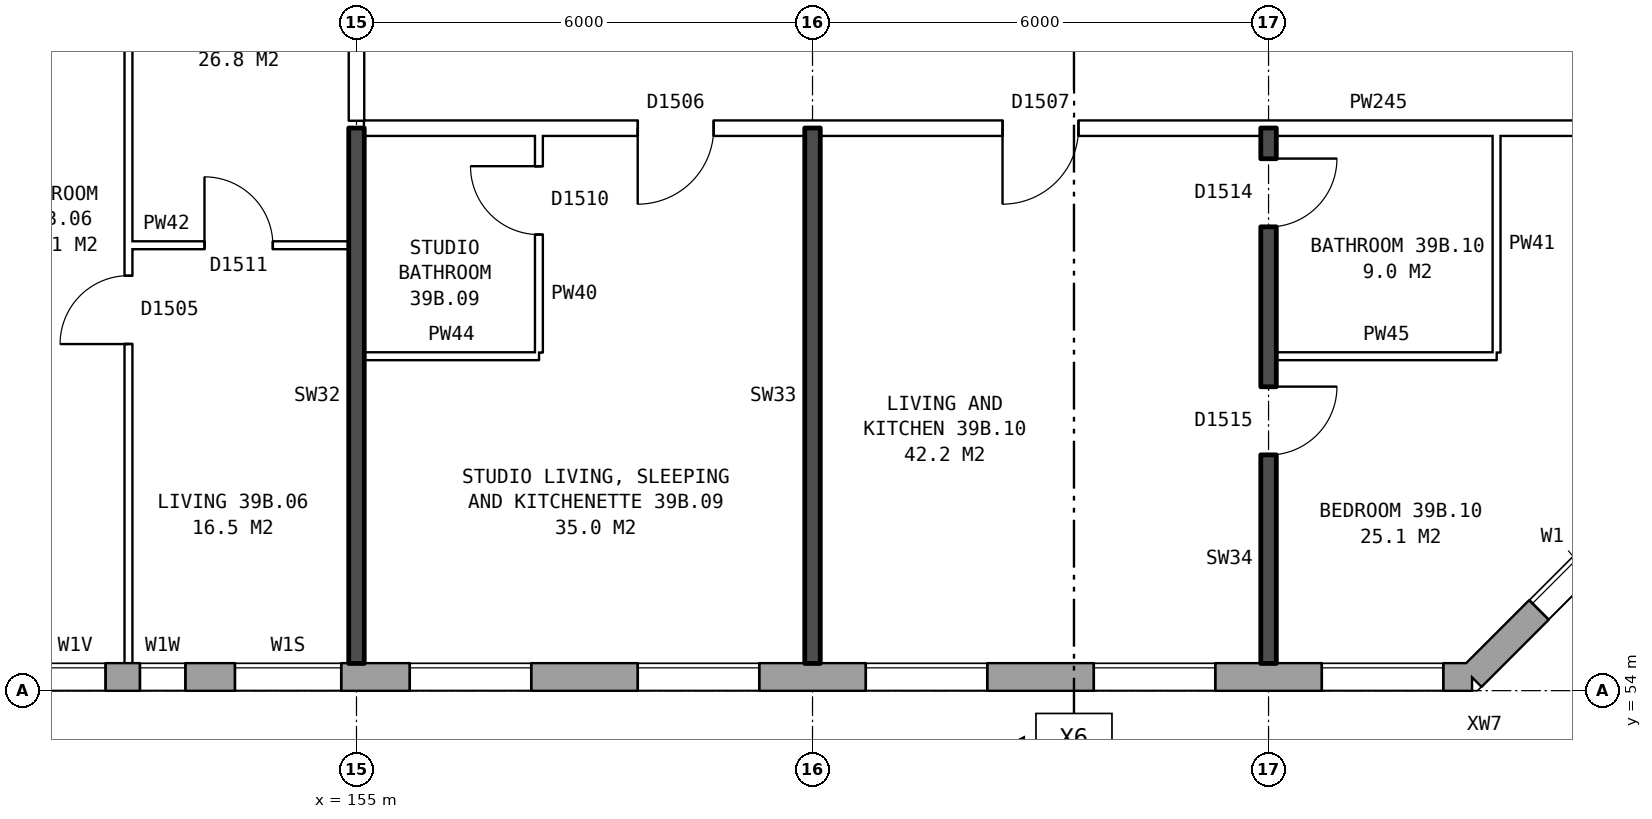
"""IFC4 building model, lengths in metres.
Left out: names, types, materials, properties, quantities, classifications, styles, units other than length and angle.
Written with IfcOpenShell. Run it as: python <this file> out.ifc"""

import sys

from ifc_helpers import new_model, si_unit, direction, frame, frame_2d, origin, place, context, subcontext, project, spatial, rectangle, extrude, element, fill, save


model = new_model("IFC4")
c1 = context("Model", 3, precision=1e-05, world=origin(), true_north=direction((0.0, 1.0)))
c2 = subcontext(c1, "Body", "Model", "MODEL_VIEW")
j1 = project(units=[si_unit("LENGTHUNIT", "METRE"), si_unit("PLANEANGLEUNIT", "RADIAN")], contexts=[c1])
p1 = place(None, origin())
s1 = spatial("IfcSite", under=j1, at=p1, CompositionType="ELEMENT")
p2 = place(p1, origin())
s2 = spatial("IfcBuilding", under=s1, at=p2, CompositionType="ELEMENT")
p3 = place(p2, frame((0.0, 0.0, 139.2)))
s3 = spatial("IfcBuildingStorey", under=s2, at=p3, CompositionType="ELEMENT", Elevation=139.2)
p4 = place(p3, frame((134.075, 54.18, 0.0), z_axis=(0.0, 0.0, 1.0), x_axis=(1.0, 0.0, 0.0)))
e1 = element("IfcWall", 1, at=p4, inside=s3, PredefinedType="STANDARD", context=c2, shape_type="SweptSolid", body=[
    extrude(rectangle(XDim=35.601, YDim=0.36, at=frame_2d((17.8, 0.0))), origin(), (0.0, 0.0, 1.0), 2.85),
])
p5 = place(p4, frame((0.625, 0.0, 0.8)))
e2 = element("IfcOpeningElement", 2, at=p5, cuts=e1, PredefinedType="OPENING", context=c2, shape_type="SweptSolid", body=[
    extrude(rectangle(XDim=1.6, YDim=1.8, at=frame_2d((0.8, 0.9))), frame((0.0, 0.19, 0.0), z_axis=(0.0, -1.0, 0.0), x_axis=(1.0, 0.0, 0.0)), (0.0, 0.0, 1.0), 0.38),
])
p6 = place(p4, frame((3.625, 0.0, 0.8)))
e3 = element("IfcOpeningElement", 3, at=p6, cuts=e1, PredefinedType="OPENING", context=c2, shape_type="SweptSolid", body=[
    extrude(rectangle(XDim=1.6, YDim=1.8, at=frame_2d((0.8, 0.9))), frame((0.0, 0.19, 0.0), z_axis=(0.0, -1.0, 0.0), x_axis=(1.0, 0.0, 0.0)), (0.0, 0.0, 1.0), 0.38),
])
p7 = place(p4, frame((6.625, 0.0, 0.8)))
e4 = element("IfcOpeningElement", 4, at=p7, cuts=e1, PredefinedType="OPENING", context=c2, shape_type="SweptSolid", body=[
    extrude(rectangle(XDim=1.6, YDim=1.8, at=frame_2d((0.8, 0.9))), frame((0.0, 0.19, 0.0), z_axis=(0.0, -1.0, 0.0), x_axis=(1.0, 0.0, 0.0)), (0.0, 0.0, 1.0), 0.38),
])
p8 = place(p4, frame((9.625, 0.0, 0.8)))
e5 = element("IfcOpeningElement", 5, at=p8, cuts=e1, PredefinedType="OPENING", context=c2, shape_type="SweptSolid", body=[
    extrude(rectangle(XDim=1.6, YDim=1.8, at=frame_2d((0.8, 0.9))), frame((0.0, 0.19, 0.0), z_axis=(0.0, -1.0, 0.0), x_axis=(1.0, 0.0, 0.0)), (0.0, 0.0, 1.0), 0.38),
])
p9 = place(p4, frame((12.625, 0.0, 0.8)))
e6 = element("IfcOpeningElement", 6, at=p9, cuts=e1, PredefinedType="OPENING", context=c2, shape_type="SweptSolid", body=[
    extrude(rectangle(XDim=1.6, YDim=1.8, at=frame_2d((0.8, 0.9))), frame((0.0, 0.19, 0.0), z_axis=(0.0, -1.0, 0.0), x_axis=(1.0, 0.0, 0.0)), (0.0, 0.0, 1.0), 0.38),
])
p10 = place(p4, frame((15.125, 0.0, 1.25)))
e7 = element("IfcOpeningElement", 7, at=p10, cuts=e1, PredefinedType="OPENING", context=c2, shape_type="SweptSolid", body=[
    extrude(rectangle(XDim=0.8, YDim=1.2, at=frame_2d((0.4, 0.6))), frame((0.0, 0.19, 0.0), z_axis=(0.0, -1.0, 0.0), x_axis=(1.0, 0.0, 0.0)), (0.0, 0.0, 1.0), 0.38),
])
p11 = place(p4, frame((18.075, 0.0, 0.25)))
e8 = element("IfcOpeningElement", 8, at=p11, cuts=e1, PredefinedType="OPENING", context=c2, shape_type="SweptSolid", body=[
    extrude(rectangle(XDim=0.6, YDim=0.9, at=frame_2d((0.3, 0.45))), frame((0.0, 0.19, 0.0), z_axis=(0.0, -1.0, 0.0), x_axis=(1.0, 0.0, 0.0)), (0.0, 0.0, 1.0), 0.38),
])
p12 = place(p4, frame((21.625, 0.0, 0.8)))
e9 = element("IfcOpeningElement", 9, at=p12, cuts=e1, PredefinedType="OPENING", context=c2, shape_type="SweptSolid", body=[
    extrude(rectangle(XDim=1.6, YDim=1.8, at=frame_2d((0.8, 0.9))), frame((0.0, 0.19, 0.0), z_axis=(0.0, -1.0, 0.0), x_axis=(1.0, 0.0, 0.0)), (0.0, 0.0, 1.0), 0.38),
])
p13 = place(p4, frame((24.625, 0.0, 0.8)))
e10 = element("IfcOpeningElement", 10, at=p13, cuts=e1, PredefinedType="OPENING", context=c2, shape_type="SweptSolid", body=[
    extrude(rectangle(XDim=1.6, YDim=1.8, at=frame_2d((0.8, 0.9))), frame((0.0, 0.19, 0.0), z_axis=(0.0, -1.0, 0.0), x_axis=(1.0, 0.0, 0.0)), (0.0, 0.0, 1.0), 0.38),
])
p14 = place(p4, frame((27.625, 0.0, 0.8)))
e11 = element("IfcOpeningElement", 11, at=p14, cuts=e1, PredefinedType="OPENING", context=c2, shape_type="SweptSolid", body=[
    extrude(rectangle(XDim=1.6, YDim=1.8, at=frame_2d((0.8, 0.9))), frame((0.0, 0.19, 0.0), z_axis=(0.0, -1.0, 0.0), x_axis=(1.0, 0.0, 0.0)), (0.0, 0.0, 1.0), 0.38),
])
p15 = place(p4, frame((30.625, 0.0, 0.8)))
e12 = element("IfcOpeningElement", 12, at=p15, cuts=e1, PredefinedType="OPENING", context=c2, shape_type="SweptSolid", body=[
    extrude(rectangle(XDim=1.6, YDim=1.8, at=frame_2d((0.8, 0.9))), frame((0.0, 0.19, 0.0), z_axis=(0.0, -1.0, 0.0), x_axis=(1.0, 0.0, 0.0)), (0.0, 0.0, 1.0), 0.38),
])
p16 = place(p4, frame((33.625, 0.0, 0.8)))
e13 = element("IfcOpeningElement", 13, at=p16, cuts=e1, PredefinedType="OPENING", context=c2, shape_type="SweptSolid", body=[
    extrude(rectangle(XDim=1.6, YDim=1.8, at=frame_2d((0.8, 0.9))), frame((0.0, 0.19, 0.0), z_axis=(0.0, -1.0, 0.0), x_axis=(1.0, 0.0, 0.0)), (0.0, 0.0, 1.0), 0.38),
])
p17 = place(p4, frame((16.825, 0.0, 0.15)))
e14 = element("IfcOpeningElement", 14, at=p17, cuts=e1, PredefinedType="OPENING", context=c2, shape_type="SweptSolid", body=[
    extrude(rectangle(XDim=0.8, YDim=0.9, at=frame_2d((0.4, 0.45))), frame((0.0, 0.19, 0.0), z_axis=(0.0, -1.0, 0.0), x_axis=(1.0, 0.0, 0.0)), (0.0, 0.0, 1.0), 0.38),
])
p18 = place(p4, frame((19.325, 0.0, 1.65)))
e15 = element("IfcOpeningElement", 15, at=p18, cuts=e1, PredefinedType="OPENING", context=c2, shape_type="SweptSolid", body=[
    extrude(rectangle(XDim=1.4, YDim=0.9, at=frame_2d((0.7, 0.45))), frame((0.0, 0.19, 0.0), z_axis=(0.0, -1.0, 0.0), x_axis=(1.0, 0.0, 0.0)), (0.0, 0.0, 1.0), 0.38),
])
p19 = place(p3, frame((169.675, 54.18, 0.0), z_axis=(0.0, 0.0, 1.0), x_axis=(0.707106781187, 0.707106781187, 0.0)))
e16 = element("IfcWall", 16, at=p19, inside=s3, PredefinedType="STANDARD", context=c2, shape_type="SweptSolid", body=[
    extrude(rectangle(XDim=4.094, YDim=0.36, at=frame_2d((2.047, 0.0))), origin(), (0.0, 0.0, 1.0), 2.85),
])
p20 = place(p19, frame((1.247, 0.0, 0.8)))
e17 = element("IfcOpeningElement", 17, at=p20, cuts=e16, PredefinedType="OPENING", context=c2, shape_type="SweptSolid", body=[
    extrude(rectangle(XDim=1.6, YDim=1.8, at=frame_2d((0.8, 0.9))), frame((0.0, 0.19, 0.0), z_axis=(0.0, -1.0, 0.0), x_axis=(1.0, 0.0, 0.0)), (0.0, 0.0, 1.0), 0.38),
])
p21 = place(p3, frame((155.1, 58.4, 0.0), z_axis=(0.0, 0.0, 1.0), x_axis=(1.0, 0.0, 0.0)))
e18 = element("IfcWall", 18, at=p21, inside=s3, PredefinedType="PARTITIONING", context=c2, shape_type="SweptSolid", body=[
    extrude(rectangle(XDim=2.3, YDim=0.1, at=frame_2d((1.15, 0.0))), origin(), (0.0, 0.0, 1.0), 2.85),
])
p22 = place(p3, frame((167.1, 58.4, 0.0), z_axis=(0.0, 0.0, 1.0), x_axis=(1.0, 0.0, 0.0)))
e19 = element("IfcWall", 19, at=p22, inside=s3, PredefinedType="PARTITIONING", context=c2, shape_type="SweptSolid", body=[
    extrude(rectangle(XDim=2.9, YDim=0.1, at=frame_2d((1.45, 0.0))), origin(), (0.0, 0.0, 1.0), 2.85),
])
p23 = place(p3, frame((152.0, 59.86, 0.0), z_axis=(0.0, 0.0, 1.0), x_axis=(1.0, 0.0, 0.0)))
e20 = element("IfcWall", 20, at=p23, inside=s3, PredefinedType="PARTITIONING", context=c2, shape_type="SweptSolid", body=[
    extrude(rectangle(XDim=2.9, YDim=0.1, at=frame_2d((1.45, 0.0))), origin(), (0.0, 0.0, 1.0), 2.85),
])
p24 = place(p23, frame((1.0, 0.0, 0.0)))
e21 = element("IfcOpeningElement", 21, at=p24, cuts=e20, PredefinedType="OPENING", context=c2, shape_type="SweptSolid", body=[
    extrude(rectangle(XDim=0.9, YDim=2.1, at=frame_2d((0.45, 1.05))), frame((0.0, 0.06, 0.0), z_axis=(0.0, -1.0, 0.0), x_axis=(1.0, 0.0, 0.0)), (0.0, 0.0, 1.0), 0.12),
])
p25 = place(p3, frame((155.1, 61.4, 0.0), z_axis=(0.0, 0.0, 1.0), x_axis=(1.0, 0.0, 0.0)))
e22 = element("IfcWall", 22, at=p25, inside=s3, PredefinedType="PARTITIONING", context=c2, shape_type="SweptSolid", body=[
    extrude(rectangle(XDim=17.29, YDim=0.2, at=frame_2d((8.645, 0.0))), origin(), (0.0, 0.0, 1.0), 2.85),
])
p26 = place(p25, frame((3.6, 0.0, 0.0)))
e23 = element("IfcOpeningElement", 23, at=p26, cuts=e22, PredefinedType="OPENING", context=c2, shape_type="SweptSolid", body=[
    extrude(rectangle(XDim=1.0, YDim=2.1, at=frame_2d((0.5, 1.05))), frame((0.0, 0.11, 0.0), z_axis=(0.0, -1.0, 0.0), x_axis=(1.0, 0.0, 0.0)), (0.0, 0.0, 1.0), 0.22),
])
p27 = place(p25, frame((8.4, 0.0, 0.0)))
e24 = element("IfcOpeningElement", 24, at=p27, cuts=e22, PredefinedType="OPENING", context=c2, shape_type="SweptSolid", body=[
    extrude(rectangle(XDim=1.0, YDim=2.1, at=frame_2d((0.5, 1.05))), frame((0.0, 0.11, 0.0), z_axis=(0.0, -1.0, 0.0), x_axis=(1.0, 0.0, 0.0)), (0.0, 0.0, 1.0), 0.22),
])
p28 = place(p3, frame((152.0, 54.36, 0.0), z_axis=(0.0, 0.0, 1.0), x_axis=(0.0, 1.0, 0.0)))
e25 = element("IfcWall", 25, at=p28, inside=s3, PredefinedType="PARTITIONING", context=c2, shape_type="SweptSolid", body=[
    extrude(rectangle(XDim=14.34, YDim=0.1, at=frame_2d((7.17, 0.0))), origin(), (0.0, 0.0, 1.0), 2.85),
])
p29 = place(p28, frame((4.2, 0.0, 0.0)))
e26 = element("IfcOpeningElement", 26, at=p29, cuts=e25, PredefinedType="OPENING", context=c2, shape_type="SweptSolid", body=[
    extrude(rectangle(XDim=0.9, YDim=2.1, at=frame_2d((0.45, 1.05))), frame((0.0, 0.06, 0.0), z_axis=(0.0, -1.0, 0.0), x_axis=(1.0, 0.0, 0.0)), (0.0, 0.0, 1.0), 0.12),
])
p30 = place(p28, frame((13.04, 0.0, 0.0)))
e27 = element("IfcOpeningElement", 27, at=p30, cuts=e25, PredefinedType="OPENING", context=c2, shape_type="SweptSolid", body=[
    extrude(rectangle(XDim=0.9, YDim=2.1, at=frame_2d((0.45, 1.05))), frame((0.0, 0.06, 0.0), z_axis=(0.0, -1.0, 0.0), x_axis=(1.0, 0.0, 0.0)), (0.0, 0.0, 1.0), 0.12),
])
p31 = place(p3, frame((155.0, 54.36, 0.0), z_axis=(0.0, 0.0, 1.0), x_axis=(0.0, 1.0, 0.0)))
e28 = element("IfcWall", 28, at=p31, inside=s3, PredefinedType="SOLIDWALL", context=c2, shape_type="SweptSolid", body=[
    extrude(rectangle(XDim=7.04, YDim=0.2, at=frame_2d((3.52, 0.0))), origin(), (0.0, 0.0, 1.0), 2.85),
])
p32 = place(p3, frame((155.0, 61.5, 0.0), z_axis=(0.0, 0.0, 1.0), x_axis=(0.0, 1.0, 0.0)))
e29 = element("IfcWall", 29, at=p32, inside=s3, PredefinedType="PARTITIONING", context=c2, shape_type="SweptSolid", body=[
    extrude(rectangle(XDim=2.2, YDim=0.2, at=frame_2d((1.1, 0.0))), origin(), (0.0, 0.0, 1.0), 2.85),
])
p33 = place(p3, frame((157.4, 58.45, 0.0), z_axis=(0.0, 0.0, 1.0), x_axis=(0.0, 1.0, 0.0)))
e30 = element("IfcWall", 30, at=p33, inside=s3, PredefinedType="PARTITIONING", context=c2, shape_type="SweptSolid", body=[
    extrude(rectangle(XDim=2.85, YDim=0.1, at=frame_2d((1.425, 0.0))), origin(), (0.0, 0.0, 1.0), 2.85),
])
p34 = place(p33, frame((1.55, 0.0, 0.0)))
e31 = element("IfcOpeningElement", 31, at=p34, cuts=e30, PredefinedType="OPENING", context=c2, shape_type="SweptSolid", body=[
    extrude(rectangle(XDim=0.9, YDim=2.1, at=frame_2d((0.45, 1.05))), frame((0.0, 0.06, 0.0), z_axis=(0.0, -1.0, 0.0), x_axis=(1.0, 0.0, 0.0)), (0.0, 0.0, 1.0), 0.12),
])
p35 = place(p3, frame((161.0, 54.36, 0.0), z_axis=(0.0, 0.0, 1.0), x_axis=(0.0, 1.0, 0.0)))
e32 = element("IfcWall", 32, at=p35, inside=s3, PredefinedType="SOLIDWALL", context=c2, shape_type="SweptSolid", body=[
    extrude(rectangle(XDim=7.04, YDim=0.2, at=frame_2d((3.52, 0.0))), origin(), (0.0, 0.0, 1.0), 2.85),
])
p36 = place(p3, frame((167.0, 54.36, 0.0), z_axis=(0.0, 0.0, 1.0), x_axis=(0.0, 1.0, 0.0)))
e33 = element("IfcWall", 33, at=p36, inside=s3, PredefinedType="SOLIDWALL", context=c2, shape_type="SweptSolid", body=[
    extrude(rectangle(XDim=7.04, YDim=0.2, at=frame_2d((3.52, 0.0))), origin(), (0.0, 0.0, 1.0), 2.85),
])
p37 = place(p36, frame((2.74, 0.0, 0.0)))
e34 = element("IfcOpeningElement", 34, at=p37, cuts=e33, PredefinedType="OPENING", context=c2, shape_type="SweptSolid", body=[
    extrude(rectangle(XDim=0.9, YDim=2.1, at=frame_2d((0.45, 1.05))), frame((0.0, 0.11, 0.0), z_axis=(0.0, -1.0, 0.0), x_axis=(1.0, 0.0, 0.0)), (0.0, 0.0, 1.0), 0.22),
])
p38 = place(p36, frame((5.74, 0.0, 0.0)))
e35 = element("IfcOpeningElement", 35, at=p38, cuts=e33, PredefinedType="OPENING", context=c2, shape_type="SweptSolid", body=[
    extrude(rectangle(XDim=0.9, YDim=2.1, at=frame_2d((0.45, 1.05))), frame((0.0, 0.11, 0.0), z_axis=(0.0, -1.0, 0.0), x_axis=(1.0, 0.0, 0.0)), (0.0, 0.0, 1.0), 0.22),
])
p39 = place(p3, frame((170.0, 58.45, 0.0), z_axis=(0.0, 0.0, 1.0), x_axis=(0.0, 1.0, 0.0)))
e36 = element("IfcWall", 36, at=p39, inside=s3, PredefinedType="PARTITIONING", context=c2, shape_type="SweptSolid", body=[
    extrude(rectangle(XDim=2.85, YDim=0.1, at=frame_2d((1.425, 0.0))), origin(), (0.0, 0.0, 1.0), 2.85),
])
p40 = place(p11, origin())
e37 = element("IfcWindow", 37, at=p40, inside=s3, PartitioningType="SINGLE_PANEL", PredefinedType="WINDOW", context=c2, shape_type="SweptSolid", body=[
    extrude(rectangle(XDim=0.6, YDim=0.9, at=frame_2d((0.3, 0.45))), frame((0.0, 0.15, 0.0), z_axis=(0.0, -1.0, 0.0), x_axis=(1.0, 0.0, 0.0)), (0.0, 0.0, 1.0), 0.06),
])
fill(e8, e37)
p41 = place(p12, origin())
e38 = element("IfcWindow", 38, at=p41, inside=s3, PartitioningType="SINGLE_PANEL", PredefinedType="WINDOW", context=c2, shape_type="SweptSolid", body=[
    extrude(rectangle(XDim=1.6, YDim=1.8, at=frame_2d((0.8, 0.9))), frame((0.0, 0.15, 0.0), z_axis=(0.0, -1.0, 0.0), x_axis=(1.0, 0.0, 0.0)), (0.0, 0.0, 1.0), 0.06),
])
fill(e9, e38)
p42 = place(p13, origin())
e39 = element("IfcWindow", 39, at=p42, inside=s3, PartitioningType="SINGLE_PANEL", PredefinedType="WINDOW", context=c2, shape_type="SweptSolid", body=[
    extrude(rectangle(XDim=1.6, YDim=1.8, at=frame_2d((0.8, 0.9))), frame((0.0, 0.15, 0.0), z_axis=(0.0, -1.0, 0.0), x_axis=(1.0, 0.0, 0.0)), (0.0, 0.0, 1.0), 0.06),
])
fill(e10, e39)
p43 = place(p14, origin())
e40 = element("IfcWindow", 40, at=p43, inside=s3, PartitioningType="SINGLE_PANEL", PredefinedType="WINDOW", context=c2, shape_type="SweptSolid", body=[
    extrude(rectangle(XDim=1.6, YDim=1.8, at=frame_2d((0.8, 0.9))), frame((0.0, 0.15, 0.0), z_axis=(0.0, -1.0, 0.0), x_axis=(1.0, 0.0, 0.0)), (0.0, 0.0, 1.0), 0.06),
])
fill(e11, e40)
p44 = place(p15, origin())
e41 = element("IfcWindow", 41, at=p44, inside=s3, PartitioningType="SINGLE_PANEL", PredefinedType="WINDOW", context=c2, shape_type="SweptSolid", body=[
    extrude(rectangle(XDim=1.6, YDim=1.8, at=frame_2d((0.8, 0.9))), frame((0.0, 0.15, 0.0), z_axis=(0.0, -1.0, 0.0), x_axis=(1.0, 0.0, 0.0)), (0.0, 0.0, 1.0), 0.06),
])
fill(e12, e41)
p45 = place(p16, origin())
e42 = element("IfcWindow", 42, at=p45, inside=s3, PartitioningType="SINGLE_PANEL", PredefinedType="WINDOW", context=c2, shape_type="SweptSolid", body=[
    extrude(rectangle(XDim=1.6, YDim=1.8, at=frame_2d((0.8, 0.9))), frame((0.0, 0.15, 0.0), z_axis=(0.0, -1.0, 0.0), x_axis=(1.0, 0.0, 0.0)), (0.0, 0.0, 1.0), 0.06),
])
fill(e13, e42)
p46 = place(p20, origin())
e43 = element("IfcWindow", 43, at=p46, inside=s3, PartitioningType="SINGLE_PANEL", PredefinedType="WINDOW", context=c2, shape_type="SweptSolid", body=[
    extrude(rectangle(XDim=1.6, YDim=1.8, at=frame_2d((0.8, 0.9))), frame((0.0, 0.15, 0.0), z_axis=(0.0, -1.0, 0.0), x_axis=(1.0, 0.0, 0.0)), (0.0, 0.0, 1.0), 0.06),
])
fill(e17, e43)
p47 = place(p29, origin())
e44 = element("IfcDoor", 44, at=p47, inside=s3, OperationType="SINGLE_SWING_LEFT", PredefinedType="DOOR", context=c2, shape_type="SweptSolid", body=[
    extrude(rectangle(XDim=0.9, YDim=2.1, at=frame_2d((0.45, 1.05))), frame((0.0, 0.025, 0.0), z_axis=(0.0, -1.0, 0.0), x_axis=(1.0, 0.0, 0.0)), (0.0, 0.0, 1.0), 0.05),
])
fill(e26, e44)
p48 = place(p24, origin())
e45 = element("IfcDoor", 45, at=p48, inside=s3, OperationType="SINGLE_SWING_LEFT", PredefinedType="DOOR", context=c2, shape_type="SweptSolid", body=[
    extrude(rectangle(XDim=0.9, YDim=2.1, at=frame_2d((0.45, 1.05))), frame((0.0, 0.025, 0.0), z_axis=(0.0, -1.0, 0.0), x_axis=(1.0, 0.0, 0.0)), (0.0, 0.0, 1.0), 0.05),
])
fill(e21, e45)
p49 = place(p26, frame((1.0, 0.0, 0.0), z_axis=(0.0, 0.0, 1.0), x_axis=(-1.0, 0.0, 0.0)))
e46 = element("IfcDoor", 46, at=p49, inside=s3, OperationType="SINGLE_SWING_RIGHT", PredefinedType="DOOR", context=c2, shape_type="SweptSolid", body=[
    extrude(rectangle(XDim=1.0, YDim=2.1, at=frame_2d((0.5, 1.05))), frame((0.0, 0.025, 0.0), z_axis=(0.0, -1.0, 0.0), x_axis=(1.0, 0.0, 0.0)), (0.0, 0.0, 1.0), 0.05),
])
fill(e23, e46)
p50 = place(p34, origin())
e47 = element("IfcDoor", 47, at=p50, inside=s3, OperationType="SINGLE_SWING_RIGHT", PredefinedType="DOOR", context=c2, shape_type="SweptSolid", body=[
    extrude(rectangle(XDim=0.9, YDim=2.1, at=frame_2d((0.45, 1.05))), frame((0.0, 0.025, 0.0), z_axis=(0.0, -1.0, 0.0), x_axis=(1.0, 0.0, 0.0)), (0.0, 0.0, 1.0), 0.05),
])
fill(e31, e47)
p51 = place(p37, frame((0.9, 0.0, 0.0), z_axis=(0.0, 0.0, 1.0), x_axis=(-1.0, 0.0, 0.0)))
e48 = element("IfcDoor", 48, at=p51, inside=s3, OperationType="SINGLE_SWING_LEFT", PredefinedType="DOOR", context=c2, shape_type="SweptSolid", body=[
    extrude(rectangle(XDim=0.9, YDim=2.1, at=frame_2d((0.45, 1.05))), frame((0.0, 0.025, 0.0), z_axis=(0.0, -1.0, 0.0), x_axis=(1.0, 0.0, 0.0)), (0.0, 0.0, 1.0), 0.05),
])
fill(e34, e48)
p52 = place(p27, frame((1.0, 0.0, 0.0), z_axis=(0.0, 0.0, 1.0), x_axis=(-1.0, 0.0, 0.0)))
e49 = element("IfcDoor", 49, at=p52, inside=s3, OperationType="SINGLE_SWING_RIGHT", PredefinedType="DOOR", context=c2, shape_type="SweptSolid", body=[
    extrude(rectangle(XDim=1.0, YDim=2.1, at=frame_2d((0.5, 1.05))), frame((0.0, 0.025, 0.0), z_axis=(0.0, -1.0, 0.0), x_axis=(1.0, 0.0, 0.0)), (0.0, 0.0, 1.0), 0.05),
])
fill(e24, e49)
p53 = place(p38, frame((0.9, 0.0, 0.0), z_axis=(0.0, 0.0, 1.0), x_axis=(-1.0, 0.0, 0.0)))
e50 = element("IfcDoor", 50, at=p53, inside=s3, OperationType="SINGLE_SWING_LEFT", PredefinedType="DOOR", context=c2, shape_type="SweptSolid", body=[
    extrude(rectangle(XDim=0.9, YDim=2.1, at=frame_2d((0.45, 1.05))), frame((0.0, 0.025, 0.0), z_axis=(0.0, -1.0, 0.0), x_axis=(1.0, 0.0, 0.0)), (0.0, 0.0, 1.0), 0.05),
])
fill(e35, e50)
p54 = place(p17, origin())
e51 = element("IfcWindow", 51, at=p54, inside=s3, PartitioningType="SINGLE_PANEL", PredefinedType="WINDOW", context=c2, shape_type="SweptSolid", body=[
    extrude(rectangle(XDim=0.8, YDim=0.9, at=frame_2d((0.4, 0.45))), frame((0.0, 0.15, 0.0), z_axis=(0.0, -1.0, 0.0), x_axis=(1.0, 0.0, 0.0)), (0.0, 0.0, 1.0), 0.06),
])
fill(e14, e51)
p55 = place(p18, origin())
e52 = element("IfcWindow", 52, at=p55, inside=s3, PartitioningType="SINGLE_PANEL", PredefinedType="WINDOW", context=c2, shape_type="SweptSolid", body=[
    extrude(rectangle(XDim=1.4, YDim=0.9, at=frame_2d((0.7, 0.45))), frame((0.0, 0.15, 0.0), z_axis=(0.0, -1.0, 0.0), x_axis=(1.0, 0.0, 0.0)), (0.0, 0.0, 1.0), 0.06),
])
fill(e15, e52)
save(model, sys.argv[1])
